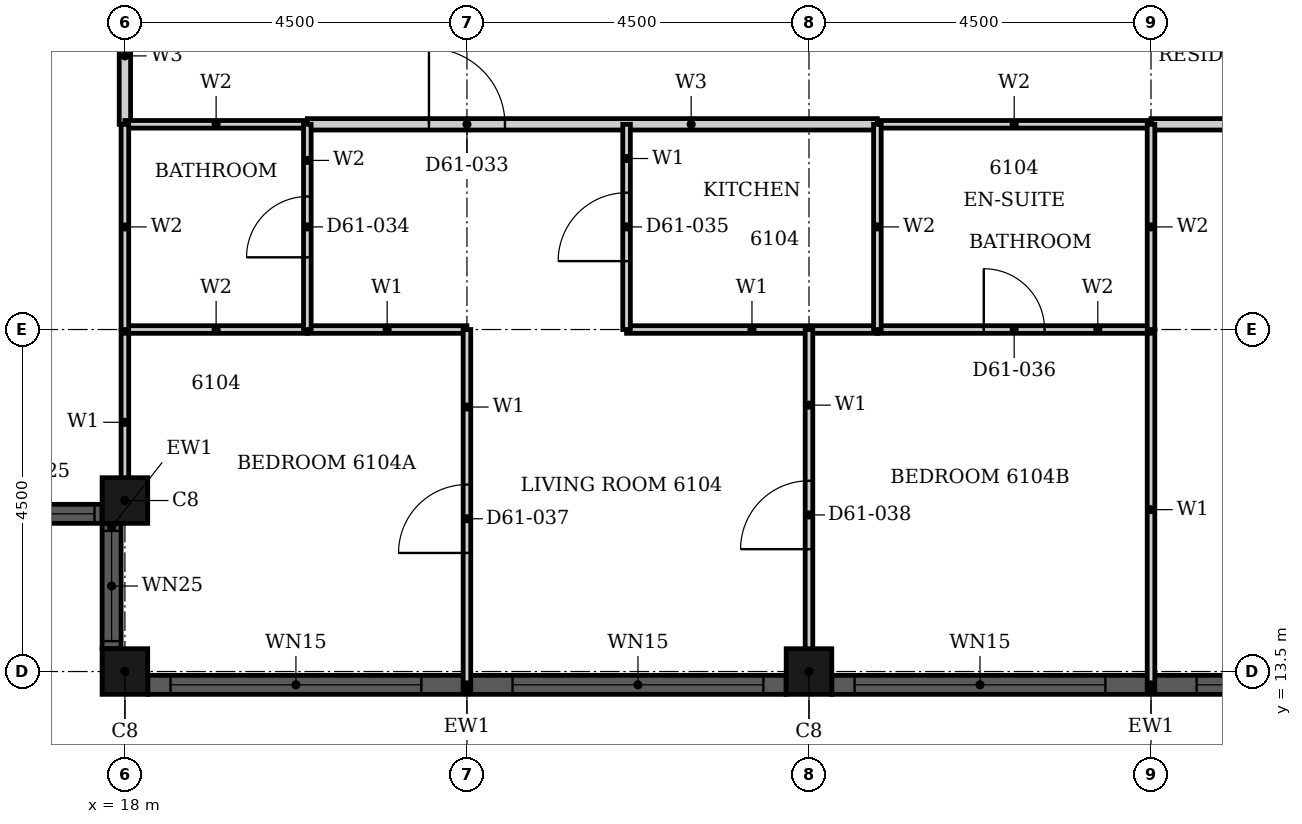
"""IFC4 building model, lengths in metres.
Left out: names, types, materials, properties, quantities, classifications, styles, units other than length and angle.
Written with IfcOpenShell. Run it as: python <this file> out.ifc"""

import sys

from ifc_helpers import new_model, si_unit, direction, frame, frame_2d, origin, origin_2d, place, context, subcontext, project, spatial, rectangle, hollow_rectangle, extrude, element, fill, save


model = new_model("IFC4")
c1 = context("Model", 3, precision=1e-05, world=origin(), true_north=direction((0.0, 1.0)))
c2 = subcontext(c1, "Body", "Model", "MODEL_VIEW")
j1 = project(units=[si_unit("LENGTHUNIT", "METRE"), si_unit("PLANEANGLEUNIT", "RADIAN")], contexts=[c1])
p1 = place(None, origin())
s1 = spatial("IfcSite", under=j1, at=p1, CompositionType="ELEMENT")
p2 = place(p1, origin())
s2 = spatial("IfcBuilding", under=s1, at=p2, CompositionType="ELEMENT")
p3 = place(p2, frame((0.0, 0.0, 241.6)))
s3 = spatial("IfcBuildingStorey", under=s2, at=p3, CompositionType="ELEMENT", Elevation=241.6)
for number, where, z_axis, x_axis in (
    (1, (18.0, 15.75, 0.0), (0.0, 0.0, 1.0), (1.0, 0.0, 0.0)),
    (2, (18.0, 13.5, 0.0), (0.0, 0.0, 1.0), (1.0, 0.0, 0.0)),
    (3, (27.0, 13.5, 0.0), (0.0, 0.0, 1.0), (1.0, 0.0, 0.0)),
):
    element("IfcColumn", number, at=place(p3, frame(where, z_axis=z_axis, x_axis=x_axis)), inside=s3, PredefinedType="COLUMN", context=c2, shape_type="SweptSolid", body=[
        extrude(hollow_rectangle(XDim=0.6, YDim=0.6, WallThickness=0.02, at=origin_2d()), origin(), (0.0, 0.0, 1.0), 3.7),
    ])
p4 = place(p3, frame((16.05, 15.575, 0.0), z_axis=(0.0, 0.0, 1.0), x_axis=(1.0, 0.0, 0.0)))
e4 = element("IfcWall", 4, at=p4, inside=s3, PredefinedType="SOLIDWALL", context=c2, shape_type="SweptSolid", body=[
    extrude(rectangle(XDim=1.65, YDim=0.25, at=frame_2d((0.825, 0.0))), origin(), (0.0, 0.0, 1.0), 3.7),
])
p5 = place(p4, frame((0.1, 0.0, 0.9)))
e5 = element("IfcOpeningElement", 5, at=p5, cuts=e4, PredefinedType="OPENING", context=c2, shape_type="SweptSolid", body=[
    extrude(rectangle(XDim=1.45, YDim=1.85, at=frame_2d((0.725, 0.925))), frame((0.0, 0.135, 0.0), z_axis=(0.0, -1.0, 0.0), x_axis=(1.0, 0.0, 0.0)), (0.0, 0.0, 1.0), 0.27),
])
p6 = place(p3, frame((17.825, 15.45, 0.0), z_axis=(0.0, 0.0, 1.0), x_axis=(0.0, -1.0, 0.0)))
e6 = element("IfcWall", 6, at=p6, inside=s3, PredefinedType="SOLIDWALL", context=c2, shape_type="SweptSolid", body=[
    extrude(rectangle(XDim=1.65, YDim=0.25, at=frame_2d((0.825, 0.0))), origin(), (0.0, 0.0, 1.0), 3.7),
])
p7 = place(p6, frame((0.1, 0.0, 0.9)))
e7 = element("IfcOpeningElement", 7, at=p7, cuts=e6, PredefinedType="OPENING", context=c2, shape_type="SweptSolid", body=[
    extrude(rectangle(XDim=1.45, YDim=1.85, at=frame_2d((0.725, 0.925))), frame((0.0, 0.135, 0.0), z_axis=(0.0, -1.0, 0.0), x_axis=(1.0, 0.0, 0.0)), (0.0, 0.0, 1.0), 0.27),
])
p8 = place(p3, frame((18.3, 13.325, 0.0), z_axis=(0.0, 0.0, 1.0), x_axis=(1.0, 0.0, 0.0)))
e8 = element("IfcWall", 8, at=p8, inside=s3, PredefinedType="SOLIDWALL", context=c2, shape_type="SweptSolid", body=[
    extrude(rectangle(XDim=8.4, YDim=0.25, at=frame_2d((4.2, 0.0))), origin(), (0.0, 0.0, 1.0), 3.7),
])
p9 = place(p8, frame((0.3, 0.0, 0.45)))
e9 = element("IfcOpeningElement", 9, at=p9, cuts=e8, PredefinedType="OPENING", context=c2, shape_type="SweptSolid", body=[
    extrude(rectangle(XDim=3.3, YDim=2.3, at=frame_2d((1.65, 1.15))), frame((0.0, 0.135, 0.0), z_axis=(0.0, -1.0, 0.0), x_axis=(1.0, 0.0, 0.0)), (0.0, 0.0, 1.0), 0.27),
])
p10 = place(p8, frame((4.8, 0.0, 0.45)))
e10 = element("IfcOpeningElement", 10, at=p10, cuts=e8, PredefinedType="OPENING", context=c2, shape_type="SweptSolid", body=[
    extrude(rectangle(XDim=3.3, YDim=2.3, at=frame_2d((1.65, 1.15))), frame((0.0, 0.135, 0.0), z_axis=(0.0, -1.0, 0.0), x_axis=(1.0, 0.0, 0.0)), (0.0, 0.0, 1.0), 0.27),
])
p11 = place(p3, frame((27.3, 13.325, 0.0), z_axis=(0.0, 0.0, 1.0), x_axis=(1.0, 0.0, 0.0)))
e11 = element("IfcWall", 11, at=p11, inside=s3, PredefinedType="SOLIDWALL", context=c2, shape_type="SweptSolid", body=[
    extrude(rectangle(XDim=8.4, YDim=0.25, at=frame_2d((4.2, 0.0))), origin(), (0.0, 0.0, 1.0), 3.7),
])
p12 = place(p11, frame((0.3, 0.0, 0.45)))
e12 = element("IfcOpeningElement", 12, at=p12, cuts=e11, PredefinedType="OPENING", context=c2, shape_type="SweptSolid", body=[
    extrude(rectangle(XDim=3.3, YDim=2.3, at=frame_2d((1.65, 1.15))), frame((0.0, 0.135, 0.0), z_axis=(0.0, -1.0, 0.0), x_axis=(1.0, 0.0, 0.0)), (0.0, 0.0, 1.0), 0.27),
])
p13 = place(p11, frame((4.8, 0.0, 0.45)))
e13 = element("IfcOpeningElement", 13, at=p13, cuts=e11, PredefinedType="OPENING", context=c2, shape_type="SweptSolid", body=[
    extrude(rectangle(XDim=3.3, YDim=2.3, at=frame_2d((1.65, 1.15))), frame((0.0, 0.135, 0.0), z_axis=(0.0, -1.0, 0.0), x_axis=(1.0, 0.0, 0.0)), (0.0, 0.0, 1.0), 0.27),
])
p14 = place(p3, frame((20.4, 20.7, 0.0), z_axis=(0.0, 0.0, 1.0), x_axis=(1.0, 0.0, 0.0)))
e14 = element("IfcWall", 14, at=p14, inside=s3, PredefinedType="PARTITIONING", context=c2, shape_type="SweptSolid", body=[
    extrude(rectangle(XDim=7.5, YDim=0.15, at=frame_2d((3.75, 0.0))), origin(), (0.0, 0.0, 1.0), 3.4),
])
p15 = place(p14, frame((1.6, 0.0, 0.0)))
e15 = element("IfcOpeningElement", 15, at=p15, cuts=e14, PredefinedType="OPENING", context=c2, shape_type="SweptSolid", body=[
    extrude(rectangle(XDim=1.0, YDim=2.2, at=frame_2d((0.5, 1.1))), frame((0.0, 0.085, 0.0), z_axis=(0.0, -1.0, 0.0), x_axis=(1.0, 0.0, 0.0)), (0.0, 0.0, 1.0), 0.17),
])
p16 = place(p3, frame((31.5, 20.7, 0.0), z_axis=(0.0, 0.0, 1.0), x_axis=(1.0, 0.0, 0.0)))
e16 = element("IfcWall", 16, at=p16, inside=s3, PredefinedType="PARTITIONING", context=c2, shape_type="SweptSolid", body=[
    extrude(rectangle(XDim=18.05, YDim=0.15, at=frame_2d((9.025, 0.0))), origin(), (0.0, 0.0, 1.0), 3.4),
])
p17 = place(p16, frame((6.25, 0.0, 0.0)))
e17 = element("IfcOpeningElement", 17, at=p17, cuts=e16, PredefinedType="OPENING", context=c2, shape_type="SweptSolid", body=[
    extrude(rectangle(XDim=1.0, YDim=2.1, at=frame_2d((0.5, 1.05))), frame((0.0, 0.085, 0.0), z_axis=(0.0, -1.0, 0.0), x_axis=(1.0, 0.0, 0.0)), (0.0, 0.0, 1.0), 0.17),
])
p18 = place(p3, frame((18.0, 20.7, 0.0), z_axis=(0.0, 0.0, 1.0), x_axis=(0.0, 1.0, 0.0)))
e18 = element("IfcWall", 18, at=p18, inside=s3, PredefinedType="PARTITIONING", context=c2, shape_type="SweptSolid", body=[
    extrude(rectangle(XDim=1.8, YDim=0.15, at=frame_2d((0.9, 0.0))), origin(), (0.0, 0.0, 1.0), 3.4),
])
p19 = place(p3, frame((20.4, 18.0, 0.0), z_axis=(0.0, 0.0, 1.0), x_axis=(1.0, 0.0, 0.0)))
e19 = element("IfcWall", 19, at=p19, inside=s3, PredefinedType="PARTITIONING", context=c2, shape_type="SweptSolid", body=[
    extrude(rectangle(XDim=2.1, YDim=0.1, at=frame_2d((1.05, 0.0))), origin(), (0.0, 0.0, 1.0), 3.4),
])
p20 = place(p3, frame((24.6, 18.0, 0.0), z_axis=(0.0, 0.0, 1.0), x_axis=(1.0, 0.0, 0.0)))
e20 = element("IfcWall", 20, at=p20, inside=s3, PredefinedType="PARTITIONING", context=c2, shape_type="SweptSolid", body=[
    extrude(rectangle(XDim=3.3, YDim=0.1, at=frame_2d((1.65, 0.0))), origin(), (0.0, 0.0, 1.0), 3.4),
])
p21 = place(p3, frame((18.0, 15.56, 0.0), z_axis=(0.0, 0.0, 1.0), x_axis=(0.0, 1.0, 0.0)))
e21 = element("IfcWall", 21, at=p21, inside=s3, PredefinedType="PARTITIONING", context=c2, shape_type="SweptSolid", body=[
    extrude(rectangle(XDim=2.439, YDim=0.1, at=frame_2d((1.219, 0.0))), origin(), (0.0, 0.0, 1.0), 3.4),
])
p22 = place(p3, frame((22.5, 13.26, 0.0), z_axis=(0.0, 0.0, 1.0), x_axis=(0.0, 1.0, 0.0)))
e22 = element("IfcWall", 22, at=p22, inside=s3, PredefinedType="PARTITIONING", context=c2, shape_type="SweptSolid", body=[
    extrude(rectangle(XDim=4.74, YDim=0.1, at=frame_2d((2.37, 0.0))), origin(), (0.0, 0.0, 1.0), 3.4),
])
p23 = place(p22, frame((1.8, 0.0, 0.0)))
e23 = element("IfcOpeningElement", 23, at=p23, cuts=e22, PredefinedType="OPENING", context=c2, shape_type="SweptSolid", body=[
    extrude(rectangle(XDim=0.9, YDim=2.1, at=frame_2d((0.45, 1.05))), frame((0.0, 0.06, 0.0), z_axis=(0.0, -1.0, 0.0), x_axis=(1.0, 0.0, 0.0)), (0.0, 0.0, 1.0), 0.12),
])
p24 = place(p3, frame((24.6, 18.0, 0.0), z_axis=(0.0, 0.0, 1.0), x_axis=(0.0, 1.0, 0.0)))
e24 = element("IfcWall", 24, at=p24, inside=s3, PredefinedType="PARTITIONING", context=c2, shape_type="SweptSolid", body=[
    extrude(rectangle(XDim=2.7, YDim=0.1, at=frame_2d((1.35, 0.0))), origin(), (0.0, 0.0, 1.0), 3.4),
])
p25 = place(p24, frame((0.9, 0.0, 0.0)))
e25 = element("IfcOpeningElement", 25, at=p25, cuts=e24, PredefinedType="OPENING", context=c2, shape_type="SweptSolid", body=[
    extrude(rectangle(XDim=0.9, YDim=2.1, at=frame_2d((0.45, 1.05))), frame((0.0, 0.06, 0.0), z_axis=(0.0, -1.0, 0.0), x_axis=(1.0, 0.0, 0.0)), (0.0, 0.0, 1.0), 0.12),
])
p26 = place(p3, frame((27.0, 13.31, 0.0), z_axis=(0.0, 0.0, 1.0), x_axis=(0.0, 1.0, 0.0)))
e26 = element("IfcWall", 26, at=p26, inside=s3, PredefinedType="PARTITIONING", context=c2, shape_type="SweptSolid", body=[
    extrude(rectangle(XDim=4.69, YDim=0.1, at=frame_2d((2.345, 0.0))), origin(), (0.0, 0.0, 1.0), 3.4),
])
p27 = place(p26, frame((1.8, 0.0, 0.0)))
e27 = element("IfcOpeningElement", 27, at=p27, cuts=e26, PredefinedType="OPENING", context=c2, shape_type="SweptSolid", body=[
    extrude(rectangle(XDim=0.9, YDim=2.1, at=frame_2d((0.45, 1.05))), frame((0.0, 0.06, 0.0), z_axis=(0.0, -1.0, 0.0), x_axis=(1.0, 0.0, 0.0)), (0.0, 0.0, 1.0), 0.12),
])
p28 = place(p3, frame((31.5, 13.26, 0.0), z_axis=(0.0, 0.0, 1.0), x_axis=(0.0, 1.0, 0.0)))
e28 = element("IfcWall", 28, at=p28, inside=s3, PredefinedType="PARTITIONING", context=c2, shape_type="SweptSolid", body=[
    extrude(rectangle(XDim=4.74, YDim=0.1, at=frame_2d((2.37, 0.0))), origin(), (0.0, 0.0, 1.0), 3.4),
])
p29 = place(p3, frame((18.0, 18.0, 0.0), z_axis=(0.0, 0.0, 1.0), x_axis=(1.0, 0.0, 0.0)))
e29 = element("IfcWall", 29, at=p29, inside=s3, PredefinedType="PARTITIONING", context=c2, shape_type="SweptSolid", body=[
    extrude(rectangle(XDim=2.4, YDim=0.1, at=frame_2d((1.2, 0.0))), origin(), (0.0, 0.0, 1.0), 3.4),
])
p30 = place(p3, frame((27.9, 18.0, 0.0), z_axis=(0.0, 0.0, 1.0), x_axis=(1.0, 0.0, 0.0)))
e30 = element("IfcWall", 30, at=p30, inside=s3, PredefinedType="PARTITIONING", context=c2, shape_type="SweptSolid", body=[
    extrude(rectangle(XDim=3.6, YDim=0.1, at=frame_2d((1.8, 0.0))), origin(), (0.0, 0.0, 1.0), 3.4),
])
p31 = place(p30, frame((1.4, 0.0, 0.0)))
e31 = element("IfcOpeningElement", 31, at=p31, cuts=e30, PredefinedType="OPENING", context=c2, shape_type="SweptSolid", body=[
    extrude(rectangle(XDim=0.8, YDim=2.1, at=frame_2d((0.4, 1.05))), frame((0.0, 0.06, 0.0), z_axis=(0.0, -1.0, 0.0), x_axis=(1.0, 0.0, 0.0)), (0.0, 0.0, 1.0), 0.12),
])
p32 = place(p3, frame((18.0, 20.7, 0.0), z_axis=(0.0, 0.0, 1.0), x_axis=(1.0, 0.0, 0.0)))
e32 = element("IfcWall", 32, at=p32, inside=s3, PredefinedType="PARTITIONING", context=c2, shape_type="SweptSolid", body=[
    extrude(rectangle(XDim=2.4, YDim=0.1, at=frame_2d((1.2, 0.0))), origin(), (0.0, 0.0, 1.0), 3.4),
])
p33 = place(p3, frame((27.9, 20.7, 0.0), z_axis=(0.0, 0.0, 1.0), x_axis=(1.0, 0.0, 0.0)))
e33 = element("IfcWall", 33, at=p33, inside=s3, PredefinedType="PARTITIONING", context=c2, shape_type="SweptSolid", body=[
    extrude(rectangle(XDim=3.6, YDim=0.1, at=frame_2d((1.8, 0.0))), origin(), (0.0, 0.0, 1.0), 3.4),
])
p34 = place(p3, frame((18.0, 18.0, 0.0), z_axis=(0.0, 0.0, 1.0), x_axis=(0.0, 1.0, 0.0)))
e34 = element("IfcWall", 34, at=p34, inside=s3, PredefinedType="PARTITIONING", context=c2, shape_type="SweptSolid", body=[
    extrude(rectangle(XDim=2.7, YDim=0.1, at=frame_2d((1.35, 0.0))), origin(), (0.0, 0.0, 1.0), 3.4),
])
p35 = place(p3, frame((20.4, 18.0, 0.0), z_axis=(0.0, 0.0, 1.0), x_axis=(0.0, 1.0, 0.0)))
e35 = element("IfcWall", 35, at=p35, inside=s3, PredefinedType="PARTITIONING", context=c2, shape_type="SweptSolid", body=[
    extrude(rectangle(XDim=2.7, YDim=0.1, at=frame_2d((1.35, 0.0))), origin(), (0.0, 0.0, 1.0), 3.4),
])
p36 = place(p35, frame((0.95, 0.0, 0.0)))
e36 = element("IfcOpeningElement", 36, at=p36, cuts=e35, PredefinedType="OPENING", context=c2, shape_type="SweptSolid", body=[
    extrude(rectangle(XDim=0.8, YDim=2.1, at=frame_2d((0.4, 1.05))), frame((0.0, 0.06, 0.0), z_axis=(0.0, -1.0, 0.0), x_axis=(1.0, 0.0, 0.0)), (0.0, 0.0, 1.0), 0.12),
])
for number, where, z_axis, x_axis in (
    (37, (27.9, 18.0, 0.0), (0.0, 0.0, 1.0), (0.0, 1.0, 0.0)),
    (38, (31.5, 18.0, 0.0), (0.0, 0.0, 1.0), (0.0, 1.0, 0.0)),
):
    element("IfcWall", number, at=place(p3, frame(where, z_axis=z_axis, x_axis=x_axis)), inside=s3, PredefinedType="PARTITIONING", context=c2, shape_type="SweptSolid", body=[
        extrude(rectangle(XDim=2.7, YDim=0.1, at=frame_2d((1.35, 0.0))), origin(), (0.0, 0.0, 1.0), 3.4),
    ])
p37 = place(p5, origin())
e39 = element("IfcWindow", 39, at=p37, inside=s3, PartitioningType="SINGLE_PANEL", PredefinedType="WINDOW", context=c2, shape_type="SweptSolid", body=[
    extrude(rectangle(XDim=1.45, YDim=1.85, at=frame_2d((0.725, 0.925))), frame((0.0, 0.03, 0.0), z_axis=(0.0, -1.0, 0.0), x_axis=(1.0, 0.0, 0.0)), (0.0, 0.0, 1.0), 0.06),
])
fill(e5, e39)
p38 = place(p7, origin())
e40 = element("IfcWindow", 40, at=p38, inside=s3, PartitioningType="SINGLE_PANEL", PredefinedType="WINDOW", context=c2, shape_type="SweptSolid", body=[
    extrude(rectangle(XDim=1.45, YDim=1.85, at=frame_2d((0.725, 0.925))), frame((0.0, 0.03, 0.0), z_axis=(0.0, -1.0, 0.0), x_axis=(1.0, 0.0, 0.0)), (0.0, 0.0, 1.0), 0.06),
])
fill(e7, e40)
p39 = place(p9, origin())
e41 = element("IfcWindow", 41, at=p39, inside=s3, PartitioningType="SINGLE_PANEL", PredefinedType="WINDOW", context=c2, shape_type="SweptSolid", body=[
    extrude(rectangle(XDim=3.3, YDim=2.3, at=frame_2d((1.65, 1.15))), frame((0.0, 0.03, 0.0), z_axis=(0.0, -1.0, 0.0), x_axis=(1.0, 0.0, 0.0)), (0.0, 0.0, 1.0), 0.06),
])
fill(e9, e41)
p40 = place(p10, origin())
e42 = element("IfcWindow", 42, at=p40, inside=s3, PartitioningType="SINGLE_PANEL", PredefinedType="WINDOW", context=c2, shape_type="SweptSolid", body=[
    extrude(rectangle(XDim=3.3, YDim=2.3, at=frame_2d((1.65, 1.15))), frame((0.0, 0.03, 0.0), z_axis=(0.0, -1.0, 0.0), x_axis=(1.0, 0.0, 0.0)), (0.0, 0.0, 1.0), 0.06),
])
fill(e10, e42)
p41 = place(p12, origin())
e43 = element("IfcWindow", 43, at=p41, inside=s3, PartitioningType="SINGLE_PANEL", PredefinedType="WINDOW", context=c2, shape_type="SweptSolid", body=[
    extrude(rectangle(XDim=3.3, YDim=2.3, at=frame_2d((1.65, 1.15))), frame((0.0, 0.03, 0.0), z_axis=(0.0, -1.0, 0.0), x_axis=(1.0, 0.0, 0.0)), (0.0, 0.0, 1.0), 0.06),
])
fill(e12, e43)
p42 = place(p13, origin())
e44 = element("IfcWindow", 44, at=p42, inside=s3, PartitioningType="SINGLE_PANEL", PredefinedType="WINDOW", context=c2, shape_type="SweptSolid", body=[
    extrude(rectangle(XDim=3.3, YDim=2.3, at=frame_2d((1.65, 1.15))), frame((0.0, 0.03, 0.0), z_axis=(0.0, -1.0, 0.0), x_axis=(1.0, 0.0, 0.0)), (0.0, 0.0, 1.0), 0.06),
])
fill(e13, e44)
p43 = place(p15, origin())
e45 = element("IfcDoor", 45, at=p43, inside=s3, OperationType="SINGLE_SWING_LEFT", PredefinedType="DOOR", context=c2, shape_type="SweptSolid", body=[
    extrude(rectangle(XDim=1.0, YDim=2.2, at=frame_2d((0.5, 1.1))), frame((0.0, 0.025, 0.0), z_axis=(0.0, -1.0, 0.0), x_axis=(1.0, 0.0, 0.0)), (0.0, 0.0, 1.0), 0.05),
])
fill(e15, e45)
p44 = place(p36, origin())
e46 = element("IfcDoor", 46, at=p44, inside=s3, OperationType="SINGLE_SWING_RIGHT", PredefinedType="DOOR", context=c2, shape_type="SweptSolid", body=[
    extrude(rectangle(XDim=0.8, YDim=2.1, at=frame_2d((0.4, 1.05))), frame((0.0, 0.025, 0.0), z_axis=(0.0, -1.0, 0.0), x_axis=(1.0, 0.0, 0.0)), (0.0, 0.0, 1.0), 0.05),
])
fill(e36, e46)
p45 = place(p25, origin())
e47 = element("IfcDoor", 47, at=p45, inside=s3, OperationType="SINGLE_SWING_RIGHT", PredefinedType="DOOR", context=c2, shape_type="SweptSolid", body=[
    extrude(rectangle(XDim=0.9, YDim=2.1, at=frame_2d((0.45, 1.05))), frame((0.0, 0.025, 0.0), z_axis=(0.0, -1.0, 0.0), x_axis=(1.0, 0.0, 0.0)), (0.0, 0.0, 1.0), 0.05),
])
fill(e25, e47)
p46 = place(p31, origin())
e48 = element("IfcDoor", 48, at=p46, inside=s3, OperationType="SINGLE_SWING_LEFT", PredefinedType="DOOR", context=c2, shape_type="SweptSolid", body=[
    extrude(rectangle(XDim=0.8, YDim=2.1, at=frame_2d((0.4, 1.05))), frame((0.0, 0.025, 0.0), z_axis=(0.0, -1.0, 0.0), x_axis=(1.0, 0.0, 0.0)), (0.0, 0.0, 1.0), 0.05),
])
fill(e31, e48)
p47 = place(p23, origin())
e49 = element("IfcDoor", 49, at=p47, inside=s3, OperationType="SINGLE_SWING_LEFT", PredefinedType="DOOR", context=c2, shape_type="SweptSolid", body=[
    extrude(rectangle(XDim=0.9, YDim=2.1, at=frame_2d((0.45, 1.05))), frame((0.0, 0.025, 0.0), z_axis=(0.0, -1.0, 0.0), x_axis=(1.0, 0.0, 0.0)), (0.0, 0.0, 1.0), 0.05),
])
fill(e23, e49)
p48 = place(p27, origin())
e50 = element("IfcDoor", 50, at=p48, inside=s3, OperationType="SINGLE_SWING_RIGHT", PredefinedType="DOOR", context=c2, shape_type="SweptSolid", body=[
    extrude(rectangle(XDim=0.9, YDim=2.1, at=frame_2d((0.45, 1.05))), frame((0.0, 0.025, 0.0), z_axis=(0.0, -1.0, 0.0), x_axis=(1.0, 0.0, 0.0)), (0.0, 0.0, 1.0), 0.05),
])
fill(e27, e50)
save(model, sys.argv[1])
